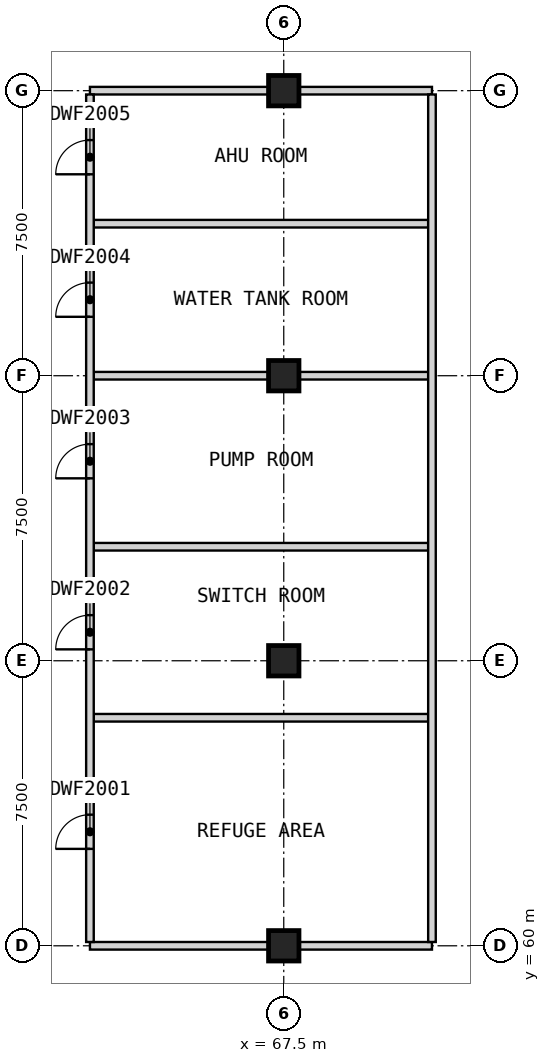
"""IFC4 building model, lengths in metres.
Left out: names, types, materials, properties, quantities, classifications, styles, units other than length and angle.
Written with IfcOpenShell. Run it as: python <this file> out.ifc"""

import sys

from ifc_helpers import new_model, si_unit, direction, frame, frame_2d, origin, origin_2d, place, context, subcontext, project, spatial, rectangle, extrude, element, fill, save


model = new_model("IFC4")
c1 = context("Model", 3, precision=1e-05, world=origin(), true_north=direction((0.0, 1.0)))
c2 = subcontext(c1, "Body", "Model", "MODEL_VIEW")
j1 = project(units=[si_unit("LENGTHUNIT", "METRE"), si_unit("PLANEANGLEUNIT", "RADIAN")], contexts=[c1])
p1 = place(None, origin())
s1 = spatial("IfcSite", under=j1, at=p1, CompositionType="ELEMENT")
p2 = place(p1, origin())
s2 = spatial("IfcBuilding", under=s1, at=p2, CompositionType="ELEMENT")
p3 = place(p2, frame((0.0, 0.0, 258.2)))
s3 = spatial("IfcBuildingStorey", under=s2, at=p3, CompositionType="ELEMENT", Elevation=258.2)
for number, where, z_axis, x_axis in (
    (1, (67.5, 60.0, 0.0), (0.0, 0.0, 1.0), (1.0, 0.0, 0.0)),
    (2, (67.5, 67.5, 0.0), (0.0, 0.0, 1.0), (1.0, 0.0, 0.0)),
    (3, (67.5, 75.0, 0.0), (0.0, 0.0, 1.0), (1.0, 0.0, 0.0)),
    (4, (67.5, 82.5, 0.0), (0.0, 0.0, 1.0), (1.0, 0.0, 0.0)),
):
    element("IfcColumn", number, at=place(p3, frame(where, z_axis=z_axis, x_axis=x_axis)), inside=s3, PredefinedType="COLUMN", context=c2, shape_type="SweptSolid", body=[
        extrude(rectangle(XDim=0.8, YDim=0.8, at=origin_2d()), origin(), (0.0, 0.0, 1.0), 8.0),
    ])
p4 = place(p3, frame((62.4, 60.0, 0.0), z_axis=(0.0, 0.0, 1.0), x_axis=(1.0, 0.0, 0.0)))
e5 = element("IfcWall", 5, at=p4, inside=s3, PredefinedType="PARTITIONING", context=c2, shape_type="SweptSolid", body=[
    extrude(rectangle(XDim=9.0, YDim=0.2, at=frame_2d((4.5, 0.0))), origin(), (0.0, 0.0, 1.0), 7.75),
])
for number, where, z_axis, x_axis in (
    (6, (62.5, 66.0, 0.0), (0.0, 0.0, 1.0), (1.0, 0.0, 0.0)),
    (7, (62.5, 70.5, 0.0), (0.0, 0.0, 1.0), (1.0, 0.0, 0.0)),
    (8, (62.5, 75.0, 0.0), (0.0, 0.0, 1.0), (1.0, 0.0, 0.0)),
    (9, (62.5, 79.0, 0.0), (0.0, 0.0, 1.0), (1.0, 0.0, 0.0)),
):
    element("IfcWall", number, at=place(p3, frame(where, z_axis=z_axis, x_axis=x_axis)), inside=s3, PredefinedType="PARTITIONING", context=c2, shape_type="SweptSolid", body=[
        extrude(rectangle(XDim=8.8, YDim=0.2, at=frame_2d((4.4, 0.0))), origin(), (0.0, 0.0, 1.0), 7.75),
    ])
p5 = place(p3, frame((62.4, 82.5, 0.0), z_axis=(0.0, 0.0, 1.0), x_axis=(1.0, 0.0, 0.0)))
e10 = element("IfcWall", 10, at=p5, inside=s3, PredefinedType="PARTITIONING", context=c2, shape_type="SweptSolid", body=[
    extrude(rectangle(XDim=9.0, YDim=0.2, at=frame_2d((4.5, 0.0))), origin(), (0.0, 0.0, 1.0), 7.75),
])
p6 = place(p3, frame((62.4, 60.1, 0.0), z_axis=(0.0, 0.0, 1.0), x_axis=(0.0, 1.0, 0.0)))
e11 = element("IfcWall", 11, at=p6, inside=s3, PredefinedType="PARTITIONING", context=c2, shape_type="SweptSolid", body=[
    extrude(rectangle(XDim=22.3, YDim=0.2, at=frame_2d((11.15, 0.0))), origin(), (0.0, 0.0, 1.0), 7.75),
])
p7 = place(p6, frame((2.45, 0.0, 0.0)))
e12 = element("IfcOpeningElement", 12, at=p7, cuts=e11, PredefinedType="OPENING", context=c2, shape_type="SweptSolid", body=[
    extrude(rectangle(XDim=0.9, YDim=2.1, at=frame_2d((0.45, 1.05))), frame((0.0, 0.11, 0.0), z_axis=(0.0, -1.0, 0.0), x_axis=(1.0, 0.0, 0.0)), (0.0, 0.0, 1.0), 0.22),
])
p8 = place(p6, frame((7.7, 0.0, 0.0)))
e13 = element("IfcOpeningElement", 13, at=p8, cuts=e11, PredefinedType="OPENING", context=c2, shape_type="SweptSolid", body=[
    extrude(rectangle(XDim=0.9, YDim=2.1, at=frame_2d((0.45, 1.05))), frame((0.0, 0.11, 0.0), z_axis=(0.0, -1.0, 0.0), x_axis=(1.0, 0.0, 0.0)), (0.0, 0.0, 1.0), 0.22),
])
p9 = place(p6, frame((12.2, 0.0, 0.0)))
e14 = element("IfcOpeningElement", 14, at=p9, cuts=e11, PredefinedType="OPENING", context=c2, shape_type="SweptSolid", body=[
    extrude(rectangle(XDim=0.9, YDim=2.1, at=frame_2d((0.45, 1.05))), frame((0.0, 0.11, 0.0), z_axis=(0.0, -1.0, 0.0), x_axis=(1.0, 0.0, 0.0)), (0.0, 0.0, 1.0), 0.22),
])
p10 = place(p6, frame((16.45, 0.0, 0.0)))
e15 = element("IfcOpeningElement", 15, at=p10, cuts=e11, PredefinedType="OPENING", context=c2, shape_type="SweptSolid", body=[
    extrude(rectangle(XDim=0.9, YDim=2.1, at=frame_2d((0.45, 1.05))), frame((0.0, 0.11, 0.0), z_axis=(0.0, -1.0, 0.0), x_axis=(1.0, 0.0, 0.0)), (0.0, 0.0, 1.0), 0.22),
])
p11 = place(p6, frame((20.2, 0.0, 0.0)))
e16 = element("IfcOpeningElement", 16, at=p11, cuts=e11, PredefinedType="OPENING", context=c2, shape_type="SweptSolid", body=[
    extrude(rectangle(XDim=0.9, YDim=2.1, at=frame_2d((0.45, 1.05))), frame((0.0, 0.11, 0.0), z_axis=(0.0, -1.0, 0.0), x_axis=(1.0, 0.0, 0.0)), (0.0, 0.0, 1.0), 0.22),
])
p12 = place(p3, frame((71.4, 60.1, 0.0), z_axis=(0.0, 0.0, 1.0), x_axis=(0.0, 1.0, 0.0)))
e17 = element("IfcWall", 17, at=p12, inside=s3, PredefinedType="PARTITIONING", context=c2, shape_type="SweptSolid", body=[
    extrude(rectangle(XDim=22.3, YDim=0.2, at=frame_2d((11.15, 0.0))), origin(), (0.0, 0.0, 1.0), 7.75),
])
p13 = place(p7, origin())
e18 = element("IfcDoor", 18, at=p13, inside=s3, OperationType="SINGLE_SWING_RIGHT", PredefinedType="DOOR", context=c2, shape_type="SweptSolid", body=[
    extrude(rectangle(XDim=0.9, YDim=2.1, at=frame_2d((0.45, 1.05))), frame((0.0, 0.025, 0.0), z_axis=(0.0, -1.0, 0.0), x_axis=(1.0, 0.0, 0.0)), (0.0, 0.0, 1.0), 0.05),
])
fill(e12, e18)
p14 = place(p8, origin())
e19 = element("IfcDoor", 19, at=p14, inside=s3, OperationType="SINGLE_SWING_RIGHT", PredefinedType="DOOR", context=c2, shape_type="SweptSolid", body=[
    extrude(rectangle(XDim=0.9, YDim=2.1, at=frame_2d((0.45, 1.05))), frame((0.0, 0.025, 0.0), z_axis=(0.0, -1.0, 0.0), x_axis=(1.0, 0.0, 0.0)), (0.0, 0.0, 1.0), 0.05),
])
fill(e13, e19)
p15 = place(p9, origin())
e20 = element("IfcDoor", 20, at=p15, inside=s3, OperationType="SINGLE_SWING_RIGHT", PredefinedType="DOOR", context=c2, shape_type="SweptSolid", body=[
    extrude(rectangle(XDim=0.9, YDim=2.1, at=frame_2d((0.45, 1.05))), frame((0.0, 0.025, 0.0), z_axis=(0.0, -1.0, 0.0), x_axis=(1.0, 0.0, 0.0)), (0.0, 0.0, 1.0), 0.05),
])
fill(e14, e20)
p16 = place(p10, origin())
e21 = element("IfcDoor", 21, at=p16, inside=s3, OperationType="SINGLE_SWING_RIGHT", PredefinedType="DOOR", context=c2, shape_type="SweptSolid", body=[
    extrude(rectangle(XDim=0.9, YDim=2.1, at=frame_2d((0.45, 1.05))), frame((0.0, 0.025, 0.0), z_axis=(0.0, -1.0, 0.0), x_axis=(1.0, 0.0, 0.0)), (0.0, 0.0, 1.0), 0.05),
])
fill(e15, e21)
p17 = place(p11, origin())
e22 = element("IfcDoor", 22, at=p17, inside=s3, OperationType="SINGLE_SWING_RIGHT", PredefinedType="DOOR", context=c2, shape_type="SweptSolid", body=[
    extrude(rectangle(XDim=0.9, YDim=2.1, at=frame_2d((0.45, 1.05))), frame((0.0, 0.025, 0.0), z_axis=(0.0, -1.0, 0.0), x_axis=(1.0, 0.0, 0.0)), (0.0, 0.0, 1.0), 0.05),
])
fill(e16, e22)
save(model, sys.argv[1])
